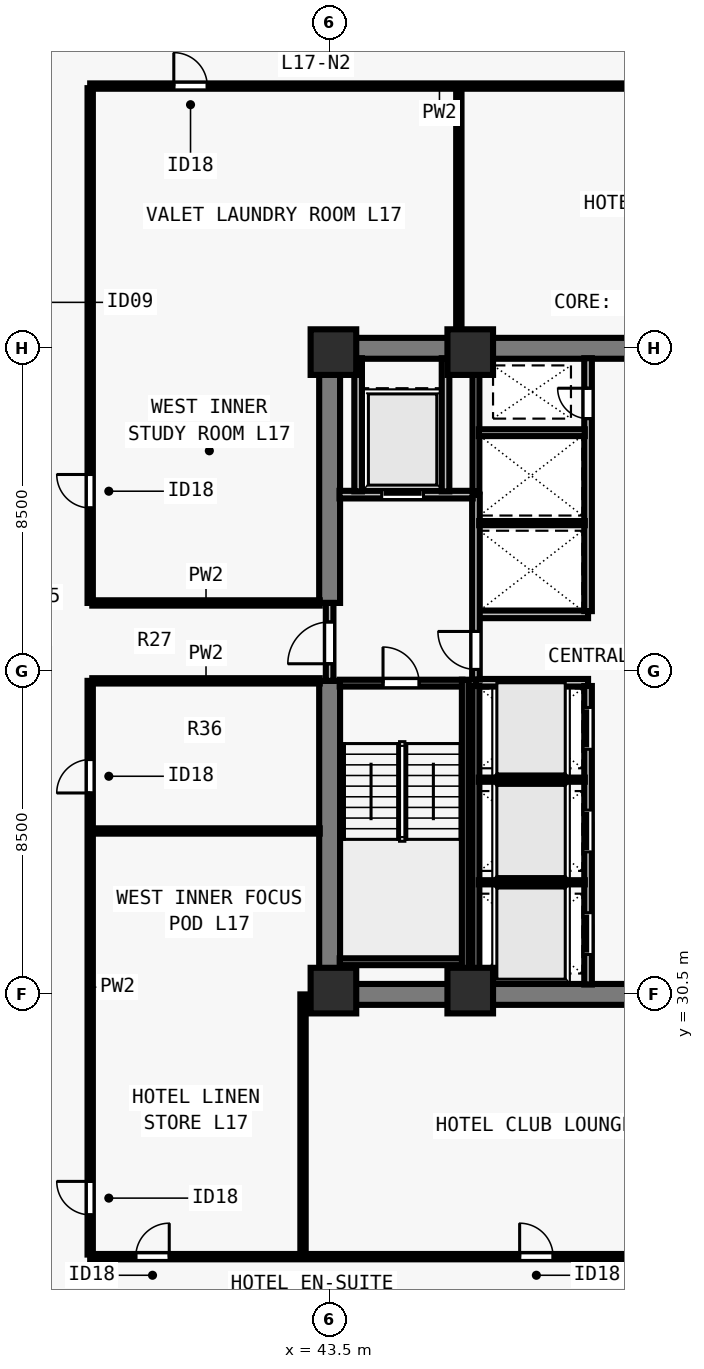
"""IFC4 building model, lengths in metres.
Left out: names, types, materials, properties, quantities, classifications, styles, units other than length and angle.
Written with IfcOpenShell. Run it as: python <this file> out.ifc"""

import sys

from ifc_helpers import new_model, si_unit, direction, frame, frame_2d, origin, origin_2d, place, context, subcontext, project, spatial, rectangle, extrude, element, fill, save


model = new_model("IFC4")
c1 = context("Model", 3, precision=1e-05, world=origin(), true_north=direction((0.0, 1.0)))
c2 = subcontext(c1, "Body", "Model", "MODEL_VIEW")
j1 = project(units=[si_unit("LENGTHUNIT", "METRE"), si_unit("PLANEANGLEUNIT", "RADIAN")], contexts=[c1])
p1 = place(None, origin())
s1 = spatial("IfcSite", under=j1, at=p1, CompositionType="ELEMENT")
p2 = place(p1, origin())
s2 = spatial("IfcBuilding", under=s1, at=p2, CompositionType="ELEMENT")
p3 = place(p2, frame((0.0, 0.0, 65.5)))
s3 = spatial("IfcBuildingStorey", under=s2, at=p3, CompositionType="ELEMENT", Elevation=65.5)
for number, where, z_axis, x_axis in (
    (1, (43.6, 30.6, 0.0), (0.0, 0.0, 1.0), (1.0, 0.0, 0.0)),
    (2, (47.2, 30.6, 0.0), (0.0, 0.0, 1.0), (1.0, 0.0, 0.0)),
    (3, (43.6, 47.4, 0.0), (0.0, 0.0, 1.0), (1.0, 0.0, 0.0)),
    (4, (47.2, 47.4, 0.0), (0.0, 0.0, 1.0), (1.0, 0.0, 0.0)),
):
    element("IfcColumn", number, at=place(p3, frame(where, z_axis=z_axis, x_axis=x_axis)), inside=s3, PredefinedType="COLUMN", context=c2, shape_type="SweptSolid", body=[
        extrude(rectangle(XDim=1.2, YDim=1.2, at=origin_2d()), origin(), (0.0, 0.0, 1.0), 3.5),
    ])
for number, where, z_axis, x_axis in (
    (5, (43.225, 30.5, 0.0), (0.0, 0.0, 1.0), (1.0, 0.0, 0.0)),
    (6, (43.225, 47.5, 0.0), (0.0, 0.0, 1.0), (1.0, 0.0, 0.0)),
):
    element("IfcWall", number, at=place(p3, frame(where, z_axis=z_axis, x_axis=x_axis)), inside=s3, PredefinedType="SHEAR", context=c2, shape_type="SweptSolid", body=[
        extrude(rectangle(XDim=17.55, YDim=0.55, at=frame_2d((8.775, 0.0))), origin(), (0.0, 0.0, 1.0), 3.28),
    ])
p4 = place(p3, frame((43.5, 30.765, 0.0), z_axis=(0.0, 0.0, 1.0), x_axis=(0.0, 1.0, 0.0)))
e7 = element("IfcWall", 7, at=p4, inside=s3, PredefinedType="SHEAR", context=c2, shape_type="SweptSolid", body=[
    extrude(rectangle(XDim=7.985, YDim=0.55, at=frame_2d((3.993, 0.0))), origin(), (0.0, 0.0, 1.0), 3.28),
])
p5 = place(p3, frame((43.5, 40.8, 0.0), z_axis=(0.0, 0.0, 1.0), x_axis=(0.0, 1.0, 0.0)))
e8 = element("IfcWall", 8, at=p5, inside=s3, PredefinedType="SHEAR", context=c2, shape_type="SweptSolid", body=[
    extrude(rectangle(XDim=6.435, YDim=0.55, at=frame_2d((3.218, 0.0))), origin(), (0.0, 0.0, 1.0), 3.28),
])
for number, where, z_axis, x_axis in (
    (9, (47.35, 38.7, 0.0), (0.0, 0.0, 1.0), (1.0, 0.0, 0.0)),
    (10, (47.35, 40.5, 0.0), (0.0, 0.0, 1.0), (1.0, 0.0, 0.0)),
):
    element("IfcWall", number, at=place(p3, frame(where, z_axis=z_axis, x_axis=x_axis)), inside=s3, PredefinedType="SOLIDWALL", context=c2, shape_type="SweptSolid", body=[
        extrude(rectangle(XDim=2.95, YDim=0.2, at=frame_2d((1.475, 0.0))), origin(), (0.0, 0.0, 1.0), 3.28),
    ])
p6 = place(p3, frame((50.3, 30.76, 0.0), z_axis=(0.0, 0.0, 1.0), x_axis=(0.0, 1.0, 0.0)))
e11 = element("IfcWall", 11, at=p6, inside=s3, PredefinedType="SOLIDWALL", context=c2, shape_type="SweptSolid", body=[
    extrude(rectangle(XDim=7.855, YDim=0.2, at=frame_2d((3.927, 0.0))), origin(), (0.0, 0.0, 1.0), 3.28),
])
p7 = place(p6, frame((0.79, 0.0, 0.0)))
e12 = element("IfcOpeningElement", 12, at=p7, cuts=e11, PredefinedType="OPENING", context=c2, shape_type="SweptSolid", body=[
    extrude(rectangle(XDim=1.1, YDim=2.2, at=frame_2d((0.55, 1.1))), frame((0.0, 0.11, 0.0), z_axis=(0.0, -1.0, 0.0), x_axis=(1.0, 0.0, 0.0)), (0.0, 0.0, 1.0), 0.22),
])
p8 = place(p6, frame((3.49, 0.0, 0.0)))
e13 = element("IfcOpeningElement", 13, at=p8, cuts=e11, PredefinedType="OPENING", context=c2, shape_type="SweptSolid", body=[
    extrude(rectangle(XDim=1.1, YDim=2.2, at=frame_2d((0.55, 1.1))), frame((0.0, 0.11, 0.0), z_axis=(0.0, -1.0, 0.0), x_axis=(1.0, 0.0, 0.0)), (0.0, 0.0, 1.0), 0.22),
])
p9 = place(p6, frame((6.19, 0.0, 0.0)))
e14 = element("IfcOpeningElement", 14, at=p9, cuts=e11, PredefinedType="OPENING", context=c2, shape_type="SweptSolid", body=[
    extrude(rectangle(XDim=1.1, YDim=2.2, at=frame_2d((0.55, 1.1))), frame((0.0, 0.11, 0.0), z_axis=(0.0, -1.0, 0.0), x_axis=(1.0, 0.0, 0.0)), (0.0, 0.0, 1.0), 0.22),
])
p10 = place(p3, frame((50.3, 40.585, 0.0), z_axis=(0.0, 0.0, 1.0), x_axis=(0.0, 1.0, 0.0)))
e15 = element("IfcWall", 15, at=p10, inside=s3, PredefinedType="SOLIDWALL", context=c2, shape_type="SweptSolid", body=[
    extrude(rectangle(XDim=6.655, YDim=0.2, at=frame_2d((3.328, 0.0))), origin(), (0.0, 0.0, 1.0), 3.28),
])
p11 = place(p10, frame((5.065, 0.0, 0.0)))
e16 = element("IfcOpeningElement", 16, at=p11, cuts=e15, PredefinedType="OPENING", context=c2, shape_type="SweptSolid", body=[
    extrude(rectangle(XDim=0.8, YDim=2.08, at=frame_2d((0.4, 1.04))), frame((0.0, 0.11, 0.0), z_axis=(0.0, -1.0, 0.0), x_axis=(1.0, 0.0, 0.0)), (0.0, 0.0, 1.0), 0.22),
])
p12 = place(p3, frame((43.5, 38.75, 0.0), z_axis=(0.0, 0.0, 1.0), x_axis=(0.0, 1.0, 0.0)))
e17 = element("IfcWall", 17, at=p12, inside=s3, PredefinedType="SOLIDWALL", context=c2, shape_type="SweptSolid", body=[
    extrude(rectangle(XDim=2.05, YDim=0.2, at=frame_2d((1.025, 0.0))), origin(), (0.0, 0.0, 1.0), 3.28),
])
p13 = place(p12, frame((0.45, 0.0, 0.0)))
e18 = element("IfcOpeningElement", 18, at=p13, cuts=e17, PredefinedType="OPENING", context=c2, shape_type="SweptSolid", body=[
    extrude(rectangle(XDim=1.1, YDim=2.15, at=frame_2d((0.55, 1.075))), frame((0.0, 0.11, 0.0), z_axis=(0.0, -1.0, 0.0), x_axis=(1.0, 0.0, 0.0)), (0.0, 0.0, 1.0), 0.22),
])
p14 = place(p3, frame((47.35, 38.785, 0.0), z_axis=(0.0, 0.0, 1.0), x_axis=(0.0, 1.0, 0.0)))
e19 = element("IfcWall", 19, at=p14, inside=s3, PredefinedType="SOLIDWALL", context=c2, shape_type="SweptSolid", body=[
    extrude(rectangle(XDim=4.865, YDim=0.2, at=frame_2d((2.433, 0.0))), origin(), (0.0, 0.0, 1.0), 3.28),
])
p15 = place(p14, frame((0.265, 0.0, 0.0)))
e20 = element("IfcOpeningElement", 20, at=p15, cuts=e19, PredefinedType="OPENING", context=c2, shape_type="SweptSolid", body=[
    extrude(rectangle(XDim=1.0, YDim=2.15, at=frame_2d((0.5, 1.075))), frame((0.0, 0.11, 0.0), z_axis=(0.0, -1.0, 0.0), x_axis=(1.0, 0.0, 0.0)), (0.0, 0.0, 1.0), 0.22),
])
p16 = place(p3, frame((43.76, 43.65, 0.0), z_axis=(0.0, 0.0, 1.0), x_axis=(1.0, 0.0, 0.0)))
e21 = element("IfcWall", 21, at=p16, inside=s3, PredefinedType="SOLIDWALL", context=c2, shape_type="SweptSolid", body=[
    extrude(rectangle(XDim=3.505, YDim=0.2, at=frame_2d((1.752, 0.0))), origin(), (0.0, 0.0, 1.0), 3.28),
])
p17 = place(p16, frame((1.11, 0.0, 0.0)))
e22 = element("IfcOpeningElement", 22, at=p17, cuts=e21, PredefinedType="OPENING", context=c2, shape_type="SweptSolid", body=[
    extrude(rectangle(XDim=1.1, YDim=2.2, at=frame_2d((0.55, 1.1))), frame((0.0, 0.11, 0.0), z_axis=(0.0, -1.0, 0.0), x_axis=(1.0, 0.0, 0.0)), (0.0, 0.0, 1.0), 0.22),
])
for number, where, z_axis, x_axis in (
    (23, (46.55, 43.735, 0.0), (0.0, 0.0, 1.0), (0.0, 1.0, 0.0)),
    (24, (44.25, 43.735, 0.0), (0.0, 0.0, 1.0), (0.0, 1.0, 0.0)),
):
    element("IfcWall", number, at=place(p3, frame(where, z_axis=z_axis, x_axis=x_axis)), inside=s3, PredefinedType="SOLIDWALL", context=c2, shape_type="SweptSolid", body=[
        extrude(rectangle(XDim=3.505, YDim=0.2, at=frame_2d((1.752, 0.0))), origin(), (0.0, 0.0, 1.0), 3.28),
    ])
p18 = place(p3, frame((47.35, 30.76, 0.0), z_axis=(0.0, 0.0, 1.0), x_axis=(0.0, 1.0, 0.0)))
e25 = element("IfcWall", 25, at=p18, inside=s3, PredefinedType="SOLIDWALL", context=c2, shape_type="SweptSolid", body=[
    extrude(rectangle(XDim=7.855, YDim=0.18, at=frame_2d((3.927, 0.0))), origin(), (0.0, 0.0, 1.0), 3.28),
])
for number, where, z_axis, x_axis in (
    (26, (47.425, 33.45, 0.0), (0.0, 0.0, 1.0), (1.0, 0.0, 0.0)),
    (27, (47.425, 36.15, 0.0), (0.0, 0.0, 1.0), (1.0, 0.0, 0.0)),
):
    element("IfcWall", number, at=place(p3, frame(where, z_axis=z_axis, x_axis=x_axis)), inside=s3, PredefinedType="PARTITIONING", context=c2, shape_type="SweptSolid", body=[
        extrude(rectangle(XDim=2.79, YDim=0.11, at=frame_2d((1.395, 0.0))), origin(), (0.0, 0.0, 1.0), 3.28),
    ])
p19 = place(p3, frame((47.35, 43.735, 0.0), z_axis=(0.0, 0.0, 1.0), x_axis=(0.0, 1.0, 0.0)))
e28 = element("IfcWall", 28, at=p19, inside=s3, PredefinedType="SOLIDWALL", context=c2, shape_type="SweptSolid", body=[
    extrude(rectangle(XDim=3.505, YDim=0.18, at=frame_2d((1.752, 0.0))), origin(), (0.0, 0.0, 1.0), 3.28),
])
p20 = place(p3, frame((47.435, 42.9, 0.0), z_axis=(0.0, 0.0, 1.0), x_axis=(1.0, 0.0, 0.0)))
e29 = element("IfcWall", 29, at=p20, inside=s3, PredefinedType="PARTITIONING", context=c2, shape_type="SweptSolid", body=[
    extrude(rectangle(XDim=2.78, YDim=0.11, at=frame_2d((1.39, 0.0))), origin(), (0.0, 0.0, 1.0), 3.28),
])
p21 = place(p3, frame((47.425, 45.28, 0.0), z_axis=(0.0, 0.0, 1.0), x_axis=(1.0, 0.0, 0.0)))
e30 = element("IfcWall", 30, at=p21, inside=s3, PredefinedType="SOLIDWALL", context=c2, shape_type="SweptSolid", body=[
    extrude(rectangle(XDim=2.79, YDim=0.18, at=frame_2d((1.395, 0.0))), origin(), (0.0, 0.0, 1.0), 3.28),
])
p22 = place(p3, frame((37.2, 23.6, 0.0), z_axis=(0.0, 0.0, 1.0), x_axis=(1.0, 0.0, 0.0)))
e31 = element("IfcWall", 31, at=p22, inside=s3, PredefinedType="PARTITIONING", context=c2, shape_type="SweptSolid", body=[
    extrude(rectangle(XDim=29.6, YDim=0.14, at=frame_2d((14.8, 0.0))), origin(), (0.0, 0.0, 1.0), 3.28),
])
p23 = place(p22, frame((1.2, 0.0, 0.0)))
e32 = element("IfcOpeningElement", 32, at=p23, cuts=e31, PredefinedType="OPENING", context=c2, shape_type="SweptSolid", body=[
    extrude(rectangle(XDim=0.88, YDim=2.1, at=frame_2d((0.44, 1.05))), frame((0.0, 0.08, 0.0), z_axis=(0.0, -1.0, 0.0), x_axis=(1.0, 0.0, 0.0)), (0.0, 0.0, 1.0), 0.16),
])
p24 = place(p22, frame((11.3, 0.0, 0.0)))
e33 = element("IfcOpeningElement", 33, at=p24, cuts=e31, PredefinedType="OPENING", context=c2, shape_type="SweptSolid", body=[
    extrude(rectangle(XDim=0.88, YDim=2.1, at=frame_2d((0.44, 1.05))), frame((0.0, 0.08, 0.0), z_axis=(0.0, -1.0, 0.0), x_axis=(1.0, 0.0, 0.0)), (0.0, 0.0, 1.0), 0.16),
])
p25 = place(p22, frame((21.8, 0.0, 0.0)))
e34 = element("IfcOpeningElement", 34, at=p25, cuts=e31, PredefinedType="OPENING", context=c2, shape_type="SweptSolid", body=[
    extrude(rectangle(XDim=0.88, YDim=2.1, at=frame_2d((0.44, 1.05))), frame((0.0, 0.08, 0.0), z_axis=(0.0, -1.0, 0.0), x_axis=(1.0, 0.0, 0.0)), (0.0, 0.0, 1.0), 0.16),
])
p26 = place(p3, frame((37.2, 54.4, 0.0), z_axis=(0.0, 0.0, 1.0), x_axis=(1.0, 0.0, 0.0)))
e35 = element("IfcWall", 35, at=p26, inside=s3, PredefinedType="PARTITIONING", context=c2, shape_type="SweptSolid", body=[
    extrude(rectangle(XDim=29.6, YDim=0.14, at=frame_2d((14.8, 0.0))), origin(), (0.0, 0.0, 1.0), 3.28),
])
p27 = place(p26, frame((2.2, 0.0, 0.0)))
e36 = element("IfcOpeningElement", 36, at=p27, cuts=e35, PredefinedType="OPENING", context=c2, shape_type="SweptSolid", body=[
    extrude(rectangle(XDim=0.88, YDim=2.1, at=frame_2d((0.44, 1.05))), frame((0.0, 0.08, 0.0), z_axis=(0.0, -1.0, 0.0), x_axis=(1.0, 0.0, 0.0)), (0.0, 0.0, 1.0), 0.16),
])
p28 = place(p26, frame((15.3, 0.0, 0.0)))
e37 = element("IfcOpeningElement", 37, at=p28, cuts=e35, PredefinedType="OPENING", context=c2, shape_type="SweptSolid", body=[
    extrude(rectangle(XDim=0.88, YDim=2.1, at=frame_2d((0.44, 1.05))), frame((0.0, 0.08, 0.0), z_axis=(0.0, -1.0, 0.0), x_axis=(1.0, 0.0, 0.0)), (0.0, 0.0, 1.0), 0.16),
])
p29 = place(p26, frame((24.8, 0.0, 0.0)))
e38 = element("IfcOpeningElement", 38, at=p29, cuts=e35, PredefinedType="OPENING", context=c2, shape_type="SweptSolid", body=[
    extrude(rectangle(XDim=0.88, YDim=2.1, at=frame_2d((0.44, 1.05))), frame((0.0, 0.08, 0.0), z_axis=(0.0, -1.0, 0.0), x_axis=(1.0, 0.0, 0.0)), (0.0, 0.0, 1.0), 0.16),
])
p30 = place(p3, frame((37.2, 23.655, 0.0), z_axis=(0.0, 0.0, 1.0), x_axis=(0.0, 1.0, 0.0)))
e39 = element("IfcWall", 39, at=p30, inside=s3, PredefinedType="PARTITIONING", context=c2, shape_type="SweptSolid", body=[
    extrude(rectangle(XDim=15.095, YDim=0.14, at=frame_2d((7.547, 0.0))), origin(), (0.0, 0.0, 1.0), 3.28),
])
p31 = place(p30, frame((1.045, 0.0, 0.0)))
e40 = element("IfcOpeningElement", 40, at=p31, cuts=e39, PredefinedType="OPENING", context=c2, shape_type="SweptSolid", body=[
    extrude(rectangle(XDim=0.88, YDim=2.1, at=frame_2d((0.44, 1.05))), frame((0.0, 0.08, 0.0), z_axis=(0.0, -1.0, 0.0), x_axis=(1.0, 0.0, 0.0)), (0.0, 0.0, 1.0), 0.16),
])
p32 = place(p30, frame((12.145, 0.0, 0.0)))
e41 = element("IfcOpeningElement", 41, at=p32, cuts=e39, PredefinedType="OPENING", context=c2, shape_type="SweptSolid", body=[
    extrude(rectangle(XDim=0.88, YDim=2.1, at=frame_2d((0.44, 1.05))), frame((0.0, 0.08, 0.0), z_axis=(0.0, -1.0, 0.0), x_axis=(1.0, 0.0, 0.0)), (0.0, 0.0, 1.0), 0.16),
])
p33 = place(p3, frame((37.2, 40.8, 0.0), z_axis=(0.0, 0.0, 1.0), x_axis=(0.0, 1.0, 0.0)))
e42 = element("IfcWall", 42, at=p33, inside=s3, PredefinedType="PARTITIONING", context=c2, shape_type="SweptSolid", body=[
    extrude(rectangle(XDim=13.545, YDim=0.14, at=frame_2d((6.772, 0.0))), origin(), (0.0, 0.0, 1.0), 3.28),
])
p34 = place(p33, frame((2.5, 0.0, 0.0)))
e43 = element("IfcOpeningElement", 43, at=p34, cuts=e42, PredefinedType="OPENING", context=c2, shape_type="SweptSolid", body=[
    extrude(rectangle(XDim=0.88, YDim=2.1, at=frame_2d((0.44, 1.05))), frame((0.0, 0.08, 0.0), z_axis=(0.0, -1.0, 0.0), x_axis=(1.0, 0.0, 0.0)), (0.0, 0.0, 1.0), 0.16),
])
for number, where, z_axis, x_axis in (
    (44, (37.255, 38.75, 0.0), (0.0, 0.0, 1.0), (1.0, 0.0, 0.0)),
    (45, (37.255, 40.8, 0.0), (0.0, 0.0, 1.0), (1.0, 0.0, 0.0)),
):
    element("IfcWall", number, at=place(p3, frame(where, z_axis=z_axis, x_axis=x_axis)), inside=s3, PredefinedType="PARTITIONING", context=c2, shape_type="SweptSolid", body=[
        extrude(rectangle(XDim=5.985, YDim=0.14, at=frame_2d((2.993, 0.0))), origin(), (0.0, 0.0, 1.0), 3.28),
    ])
p35 = place(p3, frame((42.8, 23.655, 0.0), z_axis=(0.0, 0.0, 1.0), x_axis=(0.0, 1.0, 0.0)))
e46 = element("IfcWall", 46, at=p35, inside=s3, PredefinedType="PARTITIONING", context=c2, shape_type="SweptSolid", body=[
    extrude(rectangle(XDim=6.845, YDim=0.14, at=frame_2d((3.422, 0.0))), origin(), (0.0, 0.0, 1.0), 2.439),
])
p36 = place(p3, frame((46.9, 47.76, 0.0), z_axis=(0.0, 0.0, 1.0), x_axis=(0.0, 1.0, 0.0)))
e47 = element("IfcWall", 47, at=p36, inside=s3, PredefinedType="PARTITIONING", context=c2, shape_type="SweptSolid", body=[
    extrude(rectangle(XDim=6.585, YDim=0.14, at=frame_2d((3.292, 0.0))), origin(), (0.0, 0.0, 1.0), 3.28),
])
p37 = place(p3, frame((37.255, 34.8, 0.0), z_axis=(0.0, 0.0, 1.0), x_axis=(1.0, 0.0, 0.0)))
e48 = element("IfcWall", 48, at=p37, inside=s3, PredefinedType="PARTITIONING", context=c2, shape_type="SweptSolid", body=[
    extrude(rectangle(XDim=5.985, YDim=0.14, at=frame_2d((2.993, 0.0))), origin(), (0.0, 0.0, 1.0), 3.28),
])
p38 = place(p3, frame((43.765, 38.69, 0.0), z_axis=(0.0, 0.0, 1.0), x_axis=(1.0, 0.0, 0.0)))
e49 = element("IfcWall", 49, at=p38, inside=s3, PredefinedType="SOLIDWALL", context=c2, shape_type="SweptSolid", body=[
    extrude(rectangle(XDim=3.23, YDim=0.18, at=frame_2d((1.615, 0.0))), origin(), (0.0, 0.0, 1.0), 3.28),
])
p39 = place(p38, frame((1.14, 0.0, 0.0)))
e50 = element("IfcOpeningElement", 50, at=p39, cuts=e49, PredefinedType="OPENING", context=c2, shape_type="SweptSolid", body=[
    extrude(rectangle(XDim=0.95, YDim=2.15, at=frame_2d((0.475, 1.075))), frame((0.0, 0.1, 0.0), z_axis=(0.0, -1.0, 0.0), x_axis=(1.0, 0.0, 0.0)), (0.0, 0.0, 1.0), 0.2),
])
p40 = place(p3, frame((43.765, 31.36, 0.0), z_axis=(0.0, 0.0, 1.0), x_axis=(1.0, 0.0, 0.0)))
e51 = element("IfcWall", 51, at=p40, inside=s3, PredefinedType="SOLIDWALL", context=c2, shape_type="SweptSolid", body=[
    extrude(rectangle(XDim=3.23, YDim=0.18, at=frame_2d((1.615, 0.0))), origin(), (0.0, 0.0, 1.0), 3.28),
])
p41 = place(p3, frame((47.07, 38.78, 0.0), z_axis=(0.0, 0.0, 1.0), x_axis=(0.0, -1.0, 0.0)))
e52 = element("IfcWall", 52, at=p41, inside=s3, PredefinedType="SOLIDWALL", context=c2, shape_type="SweptSolid", body=[
    extrude(rectangle(XDim=8.017, YDim=0.18, at=frame_2d((4.009, 0.0))), origin(), (0.0, 0.0, 1.0), 3.28),
])
p42 = place(p13, origin())
e53 = element("IfcDoor", 53, at=p42, inside=s3, OperationType="SINGLE_SWING_LEFT", PredefinedType="DOOR", context=c2, shape_type="SweptSolid", body=[
    extrude(rectangle(XDim=1.1, YDim=2.15, at=frame_2d((0.55, 1.075))), frame((0.0, 0.025, 0.0), z_axis=(0.0, -1.0, 0.0), x_axis=(1.0, 0.0, 0.0)), (0.0, 0.0, 1.0), 0.05),
])
fill(e18, e53)
p43 = place(p15, origin())
e54 = element("IfcDoor", 54, at=p43, inside=s3, OperationType="SINGLE_SWING_RIGHT", PredefinedType="DOOR", context=c2, shape_type="SweptSolid", body=[
    extrude(rectangle(XDim=1.0, YDim=2.15, at=frame_2d((0.5, 1.075))), frame((0.0, 0.025, 0.0), z_axis=(0.0, -1.0, 0.0), x_axis=(1.0, 0.0, 0.0)), (0.0, 0.0, 1.0), 0.05),
])
fill(e20, e54)
p44 = place(p17, origin())
e55 = element("IfcDoor", 55, at=p44, inside=s3, OperationType="SLIDING_TO_LEFT", PredefinedType="DOOR", context=c2, shape_type="SweptSolid", body=[
    extrude(rectangle(XDim=1.1, YDim=2.2, at=frame_2d((0.55, 1.1))), frame((0.0, 0.025, 0.0), z_axis=(0.0, -1.0, 0.0), x_axis=(1.0, 0.0, 0.0)), (0.0, 0.0, 1.0), 0.05),
])
fill(e22, e55)
p45 = place(p7, origin())
e56 = element("IfcDoor", 56, at=p45, inside=s3, OperationType="SLIDING_TO_LEFT", PredefinedType="DOOR", context=c2, shape_type="SweptSolid", body=[
    extrude(rectangle(XDim=1.1, YDim=2.2, at=frame_2d((0.55, 1.1))), frame((0.0, 0.025, 0.0), z_axis=(0.0, -1.0, 0.0), x_axis=(1.0, 0.0, 0.0)), (0.0, 0.0, 1.0), 0.05),
])
fill(e12, e56)
p46 = place(p8, origin())
e57 = element("IfcDoor", 57, at=p46, inside=s3, OperationType="SLIDING_TO_LEFT", PredefinedType="DOOR", context=c2, shape_type="SweptSolid", body=[
    extrude(rectangle(XDim=1.1, YDim=2.2, at=frame_2d((0.55, 1.1))), frame((0.0, 0.025, 0.0), z_axis=(0.0, -1.0, 0.0), x_axis=(1.0, 0.0, 0.0)), (0.0, 0.0, 1.0), 0.05),
])
fill(e13, e57)
p47 = place(p9, origin())
e58 = element("IfcDoor", 58, at=p47, inside=s3, OperationType="SLIDING_TO_LEFT", PredefinedType="DOOR", context=c2, shape_type="SweptSolid", body=[
    extrude(rectangle(XDim=1.1, YDim=2.2, at=frame_2d((0.55, 1.1))), frame((0.0, 0.025, 0.0), z_axis=(0.0, -1.0, 0.0), x_axis=(1.0, 0.0, 0.0)), (0.0, 0.0, 1.0), 0.05),
])
fill(e14, e58)
p48 = place(p11, origin())
e59 = element("IfcDoor", 59, at=p48, inside=s3, OperationType="SINGLE_SWING_RIGHT", PredefinedType="DOOR", context=c2, shape_type="SweptSolid", body=[
    extrude(rectangle(XDim=0.8, YDim=2.08, at=frame_2d((0.4, 1.04))), frame((0.0, 0.025, 0.0), z_axis=(0.0, -1.0, 0.0), x_axis=(1.0, 0.0, 0.0)), (0.0, 0.0, 1.0), 0.05),
])
fill(e16, e59)
p49 = place(p23, origin())
e60 = element("IfcDoor", 60, at=p49, inside=s3, OperationType="SINGLE_SWING_RIGHT", PredefinedType="DOOR", context=c2, shape_type="SweptSolid", body=[
    extrude(rectangle(XDim=0.88, YDim=2.1, at=frame_2d((0.44, 1.05))), frame((0.0, 0.025, 0.0), z_axis=(0.0, -1.0, 0.0), x_axis=(1.0, 0.0, 0.0)), (0.0, 0.0, 1.0), 0.05),
])
fill(e32, e60)
p50 = place(p24, origin())
e61 = element("IfcDoor", 61, at=p50, inside=s3, OperationType="SINGLE_SWING_LEFT", PredefinedType="DOOR", context=c2, shape_type="SweptSolid", body=[
    extrude(rectangle(XDim=0.88, YDim=2.1, at=frame_2d((0.44, 1.05))), frame((0.0, 0.025, 0.0), z_axis=(0.0, -1.0, 0.0), x_axis=(1.0, 0.0, 0.0)), (0.0, 0.0, 1.0), 0.05),
])
fill(e33, e61)
p51 = place(p27, origin())
e62 = element("IfcDoor", 62, at=p51, inside=s3, OperationType="SINGLE_SWING_LEFT", PredefinedType="DOOR", context=c2, shape_type="SweptSolid", body=[
    extrude(rectangle(XDim=0.88, YDim=2.1, at=frame_2d((0.44, 1.05))), frame((0.0, 0.025, 0.0), z_axis=(0.0, -1.0, 0.0), x_axis=(1.0, 0.0, 0.0)), (0.0, 0.0, 1.0), 0.05),
])
fill(e36, e62)
p52 = place(p31, origin())
e63 = element("IfcDoor", 63, at=p52, inside=s3, OperationType="SINGLE_SWING_RIGHT", PredefinedType="DOOR", context=c2, shape_type="SweptSolid", body=[
    extrude(rectangle(XDim=0.88, YDim=2.1, at=frame_2d((0.44, 1.05))), frame((0.0, 0.025, 0.0), z_axis=(0.0, -1.0, 0.0), x_axis=(1.0, 0.0, 0.0)), (0.0, 0.0, 1.0), 0.05),
])
fill(e40, e63)
p53 = place(p32, origin())
e64 = element("IfcDoor", 64, at=p53, inside=s3, OperationType="SINGLE_SWING_LEFT", PredefinedType="DOOR", context=c2, shape_type="SweptSolid", body=[
    extrude(rectangle(XDim=0.88, YDim=2.1, at=frame_2d((0.44, 1.05))), frame((0.0, 0.025, 0.0), z_axis=(0.0, -1.0, 0.0), x_axis=(1.0, 0.0, 0.0)), (0.0, 0.0, 1.0), 0.05),
])
fill(e41, e64)
p54 = place(p34, origin())
e65 = element("IfcDoor", 65, at=p54, inside=s3, OperationType="SINGLE_SWING_RIGHT", PredefinedType="DOOR", context=c2, shape_type="SweptSolid", body=[
    extrude(rectangle(XDim=0.88, YDim=2.1, at=frame_2d((0.44, 1.05))), frame((0.0, 0.025, 0.0), z_axis=(0.0, -1.0, 0.0), x_axis=(1.0, 0.0, 0.0)), (0.0, 0.0, 1.0), 0.05),
])
fill(e43, e65)
p55 = place(p39, origin())
e66 = element("IfcDoor", 66, at=p55, inside=s3, OperationType="SINGLE_SWING_LEFT", PredefinedType="DOOR", context=c2, shape_type="SweptSolid", body=[
    extrude(rectangle(XDim=0.95, YDim=2.15, at=frame_2d((0.475, 1.075))), frame((0.0, 0.025, 0.0), z_axis=(0.0, -1.0, 0.0), x_axis=(1.0, 0.0, 0.0)), (0.0, 0.0, 1.0), 0.05),
])
fill(e50, e66)
save(model, sys.argv[1])
